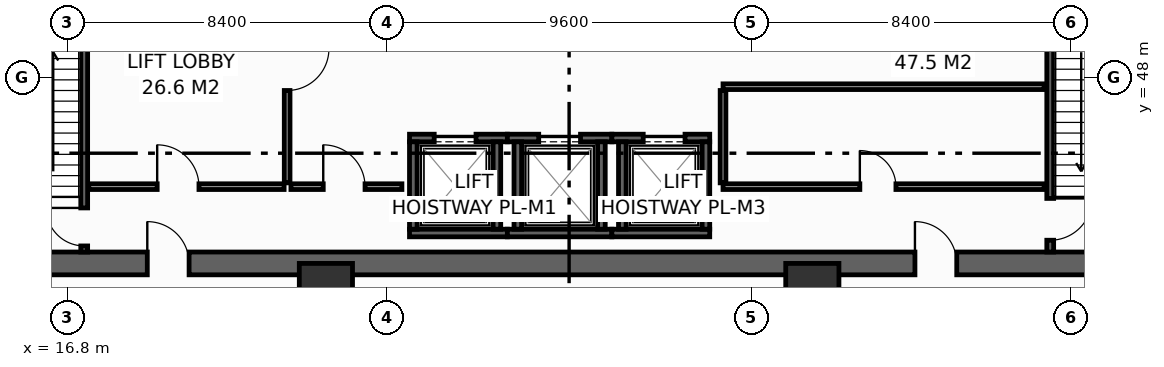
"""IFC4 building model, lengths in metres.
Left out: names, types, materials, properties, quantities, classifications, styles, units other than length and angle.
Written with IfcOpenShell. Run it as: python <this file> out.ifc"""

import sys

from ifc_helpers import new_model, si_unit, direction, frame, frame_2d, origin, origin_2d, place, context, subcontext, project, spatial, rectangle, hollow_rectangle, extrude, element, fill, save


model = new_model("IFC4")
c1 = context("Model", 3, precision=1e-05, world=origin(), true_north=direction((0.0, 1.0)))
c2 = subcontext(c1, "Body", "Model", "MODEL_VIEW")
j1 = project(units=[si_unit("LENGTHUNIT", "METRE"), si_unit("PLANEANGLEUNIT", "RADIAN")], contexts=[c1])
p1 = place(None, origin())
s1 = spatial("IfcSite", under=j1, at=p1, CompositionType="ELEMENT")
p2 = place(p1, origin())
s2 = spatial("IfcBuilding", under=s1, at=p2, CompositionType="ELEMENT")
p3 = place(p2, origin())
s3 = spatial("IfcBuildingStorey", under=s2, at=p3, CompositionType="ELEMENT", Elevation=0.0)
p4 = place(p3, frame((13.5, 43.1, 0.0), z_axis=(0.0, 0.0, 1.0), x_axis=(1.0, 0.0, 0.0)))
e1 = element("IfcWall", 1, at=p4, inside=s3, PredefinedType="SHEAR", context=c2, shape_type="SweptSolid", body=[
    extrude(rectangle(XDim=32.9, YDim=0.6, at=frame_2d((16.45, 0.0))), origin(), (0.0, 0.0, 1.0), 5.7),
])
p5 = place(p4, frame((5.4, 0.0, 0.0)))
e2 = element("IfcOpeningElement", 2, at=p5, cuts=e1, PredefinedType="OPENING", context=c2, shape_type="SweptSolid", body=[
    extrude(rectangle(XDim=1.1, YDim=2.15, at=frame_2d((0.55, 1.075))), frame((0.0, 0.31, 0.0), z_axis=(0.0, -1.0, 0.0), x_axis=(1.0, 0.0, 0.0)), (0.0, 0.0, 1.0), 0.62),
])
p6 = place(p4, frame((25.6, 0.0, 0.0)))
e3 = element("IfcOpeningElement", 3, at=p6, cuts=e1, PredefinedType="OPENING", context=c2, shape_type="SweptSolid", body=[
    extrude(rectangle(XDim=1.1, YDim=2.15, at=frame_2d((0.55, 1.075))), frame((0.0, 0.31, 0.0), z_axis=(0.0, -1.0, 0.0), x_axis=(1.0, 0.0, 0.0)), (0.0, 0.0, 1.0), 0.62),
])
for number, where, z_axis, x_axis in (
    (4, (23.6, 42.4, 0.0), (0.0, 0.0, 1.0), (1.0, 0.0, 0.0)),
    (5, (36.4, 42.4, 0.0), (0.0, 0.0, 1.0), (1.0, 0.0, 0.0)),
):
    element("IfcColumn", number, at=place(p3, frame(where, z_axis=z_axis, x_axis=x_axis)), inside=s3, PredefinedType="COLUMN", context=c2, shape_type="SweptSolid", body=[
        extrude(hollow_rectangle(XDim=1.4, YDim=1.4, WallThickness=0.065, at=origin_2d()), origin(), (0.0, 0.0, 1.0), 6.0),
    ])
p7 = place(p3, frame((25.8, 43.9, 0.0), z_axis=(0.0, 0.0, 1.0), x_axis=(1.0, 0.0, 0.0)))
e6 = element("IfcWall", 6, at=p7, inside=s3, PredefinedType="SHEAR", context=c2, shape_type="SweptSolid", body=[
    extrude(rectangle(XDim=2.575, YDim=0.2, at=frame_2d((1.288, 0.0))), origin(), (0.0, 0.0, 1.0), 5.7),
])
p8 = place(p3, frame((25.8, 46.4, 0.0), z_axis=(0.0, 0.0, 1.0), x_axis=(1.0, 0.0, 0.0)))
e7 = element("IfcWall", 7, at=p8, inside=s3, PredefinedType="SHEAR", context=c2, shape_type="SweptSolid", body=[
    extrude(rectangle(XDim=2.575, YDim=0.2, at=frame_2d((1.288, 0.0))), origin(), (0.0, 0.0, 1.0), 5.7),
])
p9 = place(p8, frame((0.65, 0.0, 0.0)))
e8 = element("IfcOpeningElement", 8, at=p9, cuts=e7, PredefinedType="OPENING", context=c2, shape_type="SweptSolid", body=[
    extrude(rectangle(XDim=1.1, YDim=2.2, at=frame_2d((0.55, 1.1))), frame((0.0, 0.11, 0.0), z_axis=(0.0, -1.0, 0.0), x_axis=(1.0, 0.0, 0.0)), (0.0, 0.0, 1.0), 0.22),
])
for number, where, z_axis, x_axis in (
    (9, (25.9, 44.0, 0.0), (0.0, 0.0, 1.0), (0.0, 1.0, 0.0)),
    (10, (28.1, 44.0, 0.0), (0.0, 0.0, 1.0), (0.0, 1.0, 0.0)),
):
    element("IfcWall", number, at=place(p3, frame(where, z_axis=z_axis, x_axis=x_axis)), inside=s3, PredefinedType="SHEAR", context=c2, shape_type="SweptSolid", body=[
        extrude(rectangle(XDim=2.3, YDim=0.2, at=frame_2d((1.15, 0.0))), origin(), (0.0, 0.0, 1.0), 5.7),
    ])
p10 = place(p3, frame((28.375, 43.9, 0.0), z_axis=(0.0, 0.0, 1.0), x_axis=(1.0, 0.0, 0.0)))
e11 = element("IfcWall", 11, at=p10, inside=s3, PredefinedType="SHEAR", context=c2, shape_type="SweptSolid", body=[
    extrude(rectangle(XDim=2.75, YDim=0.2, at=frame_2d((1.375, 0.0))), origin(), (0.0, 0.0, 1.0), 5.7),
])
p11 = place(p3, frame((28.375, 46.4, 0.0), z_axis=(0.0, 0.0, 1.0), x_axis=(1.0, 0.0, 0.0)))
e12 = element("IfcWall", 12, at=p11, inside=s3, PredefinedType="SHEAR", context=c2, shape_type="SweptSolid", body=[
    extrude(rectangle(XDim=2.75, YDim=0.2, at=frame_2d((1.375, 0.0))), origin(), (0.0, 0.0, 1.0), 5.7),
])
p12 = place(p11, frame((0.825, 0.0, 0.0)))
e13 = element("IfcOpeningElement", 13, at=p12, cuts=e12, PredefinedType="OPENING", context=c2, shape_type="SweptSolid", body=[
    extrude(rectangle(XDim=1.1, YDim=2.2, at=frame_2d((0.55, 1.1))), frame((0.0, 0.11, 0.0), z_axis=(0.0, -1.0, 0.0), x_axis=(1.0, 0.0, 0.0)), (0.0, 0.0, 1.0), 0.22),
])
for number, where, z_axis, x_axis in (
    (14, (28.65, 44.0, 0.0), (0.0, 0.0, 1.0), (0.0, 1.0, 0.0)),
    (15, (30.85, 44.0, 0.0), (0.0, 0.0, 1.0), (0.0, 1.0, 0.0)),
):
    element("IfcWall", number, at=place(p3, frame(where, z_axis=z_axis, x_axis=x_axis)), inside=s3, PredefinedType="SHEAR", context=c2, shape_type="SweptSolid", body=[
        extrude(rectangle(XDim=2.3, YDim=0.2, at=frame_2d((1.15, 0.0))), origin(), (0.0, 0.0, 1.0), 5.7),
    ])
p13 = place(p3, frame((31.125, 43.9, 0.0), z_axis=(0.0, 0.0, 1.0), x_axis=(1.0, 0.0, 0.0)))
e16 = element("IfcWall", 16, at=p13, inside=s3, PredefinedType="SHEAR", context=c2, shape_type="SweptSolid", body=[
    extrude(rectangle(XDim=2.575, YDim=0.2, at=frame_2d((1.288, 0.0))), origin(), (0.0, 0.0, 1.0), 5.7),
])
p14 = place(p3, frame((31.125, 46.4, 0.0), z_axis=(0.0, 0.0, 1.0), x_axis=(1.0, 0.0, 0.0)))
e17 = element("IfcWall", 17, at=p14, inside=s3, PredefinedType="SHEAR", context=c2, shape_type="SweptSolid", body=[
    extrude(rectangle(XDim=2.575, YDim=0.2, at=frame_2d((1.288, 0.0))), origin(), (0.0, 0.0, 1.0), 5.7),
])
p15 = place(p14, frame((0.825, 0.0, 0.0)))
e18 = element("IfcOpeningElement", 18, at=p15, cuts=e17, PredefinedType="OPENING", context=c2, shape_type="SweptSolid", body=[
    extrude(rectangle(XDim=1.1, YDim=2.2, at=frame_2d((0.55, 1.1))), frame((0.0, 0.11, 0.0), z_axis=(0.0, -1.0, 0.0), x_axis=(1.0, 0.0, 0.0)), (0.0, 0.0, 1.0), 0.22),
])
for number, where, z_axis, x_axis in (
    (19, (31.4, 44.0, 0.0), (0.0, 0.0, 1.0), (0.0, 1.0, 0.0)),
    (20, (33.6, 44.0, 0.0), (0.0, 0.0, 1.0), (0.0, 1.0, 0.0)),
):
    element("IfcWall", number, at=place(p3, frame(where, z_axis=z_axis, x_axis=x_axis)), inside=s3, PredefinedType="SHEAR", context=c2, shape_type="SweptSolid", body=[
        extrude(rectangle(XDim=2.3, YDim=0.2, at=frame_2d((1.15, 0.0))), origin(), (0.0, 0.0, 1.0), 5.7),
    ])
p16 = place(p3, frame((17.24, 43.4, 0.0), z_axis=(0.0, 0.0, 1.0), x_axis=(0.0, 1.0, 0.0)))
e21 = element("IfcWall", 21, at=p16, inside=s3, PredefinedType="SHEAR", context=c2, shape_type="SweptSolid", body=[
    extrude(rectangle(XDim=10.4, YDim=0.18, at=frame_2d((5.2, 0.0))), origin(), (0.0, 0.0, 1.0), 5.7),
])
p17 = place(p16, frame((0.16, 0.0, 0.0)))
e22 = element("IfcOpeningElement", 22, at=p17, cuts=e21, PredefinedType="OPENING", context=c2, shape_type="SweptSolid", body=[
    extrude(rectangle(XDim=1.0, YDim=2.15, at=frame_2d((0.5, 1.075))), frame((0.0, 0.1, 0.0), z_axis=(0.0, -1.0, 0.0), x_axis=(1.0, 0.0, 0.0)), (0.0, 0.0, 1.0), 0.2),
])
p18 = place(p3, frame((42.66, 53.8, 0.0), z_axis=(0.0, 0.0, 1.0), x_axis=(0.0, -1.0, 0.0)))
e23 = element("IfcWall", 23, at=p18, inside=s3, PredefinedType="SHEAR", context=c2, shape_type="SweptSolid", body=[
    extrude(rectangle(XDim=10.4, YDim=0.18, at=frame_2d((5.2, 0.0))), origin(), (0.0, 0.0, 1.0), 5.7),
])
p19 = place(p18, frame((8.99, 0.0, 0.0)))
e24 = element("IfcOpeningElement", 24, at=p19, cuts=e23, PredefinedType="OPENING", context=c2, shape_type="SweptSolid", body=[
    extrude(rectangle(XDim=1.1, YDim=2.15, at=frame_2d((0.55, 1.075))), frame((0.0, 0.1, 0.0), z_axis=(0.0, -1.0, 0.0), x_axis=(1.0, 0.0, 0.0)), (0.0, 0.0, 1.0), 0.2),
])
p20 = place(p3, frame((17.36, 45.12, 0.0), z_axis=(0.0, 0.0, 1.0), x_axis=(1.0, 0.0, 0.0)))
e25 = element("IfcWall", 25, at=p20, inside=s3, PredefinedType="PARTITIONING", context=c2, shape_type="SweptSolid", body=[
    extrude(rectangle(XDim=5.14, YDim=0.15, at=frame_2d((2.57, 0.0))), origin(), (0.0, 0.0, 1.0), 5.7),
])
p21 = place(p20, frame((1.8, 0.0, 0.0)))
e26 = element("IfcOpeningElement", 26, at=p21, cuts=e25, PredefinedType="OPENING", context=c2, shape_type="SweptSolid", body=[
    extrude(rectangle(XDim=1.1, YDim=2.15, at=frame_2d((0.55, 1.075))), frame((0.0, 0.085, 0.0), z_axis=(0.0, -1.0, 0.0), x_axis=(1.0, 0.0, 0.0)), (0.0, 0.0, 1.0), 0.17),
])
p22 = place(p3, frame((22.58, 50.55, 0.0), z_axis=(0.0, 0.0, 1.0), x_axis=(0.0, -1.0, 0.0)))
e27 = element("IfcWall", 27, at=p22, inside=s3, PredefinedType="PARTITIONING", context=c2, shape_type="SweptSolid", body=[
    extrude(rectangle(XDim=5.33, YDim=0.15, at=frame_2d((2.665, 0.0))), origin(), (0.0, 0.0, 1.0), 5.7),
])
p23 = place(p22, frame((1.8, 0.0, 0.0)))
e28 = element("IfcOpeningElement", 28, at=p23, cuts=e27, PredefinedType="OPENING", context=c2, shape_type="SweptSolid", body=[
    extrude(rectangle(XDim=1.1, YDim=2.15, at=frame_2d((0.55, 1.075))), frame((0.0, 0.085, 0.0), z_axis=(0.0, -1.0, 0.0), x_axis=(1.0, 0.0, 0.0)), (0.0, 0.0, 1.0), 0.17),
])
p24 = place(p3, frame((22.68, 45.12, 0.0), z_axis=(0.0, 0.0, 1.0), x_axis=(1.0, 0.0, 0.0)))
e29 = element("IfcWall", 29, at=p24, inside=s3, PredefinedType="PARTITIONING", context=c2, shape_type="SweptSolid", body=[
    extrude(rectangle(XDim=2.92, YDim=0.15, at=frame_2d((1.46, 0.0))), origin(), (0.0, 0.0, 1.0), 5.7),
])
p25 = place(p24, frame((0.85, 0.0, 0.0)))
e30 = element("IfcOpeningElement", 30, at=p25, cuts=e29, PredefinedType="OPENING", context=c2, shape_type="SweptSolid", body=[
    extrude(rectangle(XDim=1.1, YDim=2.15, at=frame_2d((0.55, 1.075))), frame((0.0, 0.085, 0.0), z_axis=(0.0, -1.0, 0.0), x_axis=(1.0, 0.0, 0.0)), (0.0, 0.0, 1.0), 0.17),
])
p26 = place(p3, frame((34.05, 45.12, 0.0), z_axis=(0.0, 0.0, 1.0), x_axis=(1.0, 0.0, 0.0)))
e31 = element("IfcWall", 31, at=p26, inside=s3, PredefinedType="PARTITIONING", context=c2, shape_type="SweptSolid", body=[
    extrude(rectangle(XDim=8.45, YDim=0.15, at=frame_2d((4.225, 0.0))), origin(), (0.0, 0.0, 1.0), 5.7),
])
p27 = place(p26, frame((3.6, 0.0, 0.0)))
e32 = element("IfcOpeningElement", 32, at=p27, cuts=e31, PredefinedType="OPENING", context=c2, shape_type="SweptSolid", body=[
    extrude(rectangle(XDim=0.95, YDim=2.15, at=frame_2d((0.475, 1.075))), frame((0.0, 0.085, 0.0), z_axis=(0.0, -1.0, 0.0), x_axis=(1.0, 0.0, 0.0)), (0.0, 0.0, 1.0), 0.17),
])
p28 = place(p3, frame((34.05, 47.75, 0.0), z_axis=(0.0, 0.0, 1.0), x_axis=(1.0, 0.0, 0.0)))
e33 = element("IfcWall", 33, at=p28, inside=s3, PredefinedType="PARTITIONING", context=c2, shape_type="SweptSolid", body=[
    extrude(rectangle(XDim=8.45, YDim=0.15, at=frame_2d((4.225, 0.0))), origin(), (0.0, 0.0, 1.0), 5.7),
])
p29 = place(p3, frame((34.05, 45.22, 0.0), z_axis=(0.0, 0.0, 1.0), x_axis=(0.0, 1.0, 0.0)))
e34 = element("IfcWall", 34, at=p29, inside=s3, PredefinedType="PARTITIONING", context=c2, shape_type="SweptSolid", body=[
    extrude(rectangle(XDim=2.43, YDim=0.15, at=frame_2d((1.215, 0.0))), origin(), (0.0, 0.0, 1.0), 5.7),
])
p30 = place(p9, origin())
e35 = element("IfcDoor", 35, at=p30, inside=s3, OperationType="SLIDING_TO_LEFT", PredefinedType="DOOR", context=c2, shape_type="SweptSolid", body=[
    extrude(rectangle(XDim=1.1, YDim=2.2, at=frame_2d((0.55, 1.1))), frame((0.0, 0.025, 0.0), z_axis=(0.0, -1.0, 0.0), x_axis=(1.0, 0.0, 0.0)), (0.0, 0.0, 1.0), 0.05),
])
fill(e8, e35)
p31 = place(p12, origin())
e36 = element("IfcDoor", 36, at=p31, inside=s3, OperationType="SLIDING_TO_LEFT", PredefinedType="DOOR", context=c2, shape_type="SweptSolid", body=[
    extrude(rectangle(XDim=1.1, YDim=2.2, at=frame_2d((0.55, 1.1))), frame((0.0, 0.025, 0.0), z_axis=(0.0, -1.0, 0.0), x_axis=(1.0, 0.0, 0.0)), (0.0, 0.0, 1.0), 0.05),
])
fill(e13, e36)
p32 = place(p15, origin())
e37 = element("IfcDoor", 37, at=p32, inside=s3, OperationType="SLIDING_TO_LEFT", PredefinedType="DOOR", context=c2, shape_type="SweptSolid", body=[
    extrude(rectangle(XDim=1.1, YDim=2.2, at=frame_2d((0.55, 1.1))), frame((0.0, 0.025, 0.0), z_axis=(0.0, -1.0, 0.0), x_axis=(1.0, 0.0, 0.0)), (0.0, 0.0, 1.0), 0.05),
])
fill(e18, e37)
p33 = place(p17, origin())
e38 = element("IfcDoor", 38, at=p33, inside=s3, OperationType="SINGLE_SWING_RIGHT", PredefinedType="DOOR", context=c2, shape_type="SweptSolid", body=[
    extrude(rectangle(XDim=1.0, YDim=2.15, at=frame_2d((0.5, 1.075))), frame((0.0, 0.025, 0.0), z_axis=(0.0, -1.0, 0.0), x_axis=(1.0, 0.0, 0.0)), (0.0, 0.0, 1.0), 0.05),
])
fill(e22, e38)
p34 = place(p19, origin())
e39 = element("IfcDoor", 39, at=p34, inside=s3, OperationType="SINGLE_SWING_LEFT", PredefinedType="DOOR", context=c2, shape_type="SweptSolid", body=[
    extrude(rectangle(XDim=1.1, YDim=2.15, at=frame_2d((0.55, 1.075))), frame((0.0, 0.025, 0.0), z_axis=(0.0, -1.0, 0.0), x_axis=(1.0, 0.0, 0.0)), (0.0, 0.0, 1.0), 0.05),
])
fill(e24, e39)
p35 = place(p21, origin())
e40 = element("IfcDoor", 40, at=p35, inside=s3, OperationType="SINGLE_SWING_LEFT", PredefinedType="DOOR", context=c2, shape_type="SweptSolid", body=[
    extrude(rectangle(XDim=1.1, YDim=2.15, at=frame_2d((0.55, 1.075))), frame((0.0, 0.025, 0.0), z_axis=(0.0, -1.0, 0.0), x_axis=(1.0, 0.0, 0.0)), (0.0, 0.0, 1.0), 0.05),
])
fill(e26, e40)
p36 = place(p23, origin())
e41 = element("IfcDoor", 41, at=p36, inside=s3, OperationType="SINGLE_SWING_LEFT", PredefinedType="DOOR", context=c2, shape_type="SweptSolid", body=[
    extrude(rectangle(XDim=1.1, YDim=2.15, at=frame_2d((0.55, 1.075))), frame((0.0, 0.025, 0.0), z_axis=(0.0, -1.0, 0.0), x_axis=(1.0, 0.0, 0.0)), (0.0, 0.0, 1.0), 0.05),
])
fill(e28, e41)
p37 = place(p25, origin())
e42 = element("IfcDoor", 42, at=p37, inside=s3, OperationType="SINGLE_SWING_LEFT", PredefinedType="DOOR", context=c2, shape_type="SweptSolid", body=[
    extrude(rectangle(XDim=1.1, YDim=2.15, at=frame_2d((0.55, 1.075))), frame((0.0, 0.025, 0.0), z_axis=(0.0, -1.0, 0.0), x_axis=(1.0, 0.0, 0.0)), (0.0, 0.0, 1.0), 0.05),
])
fill(e30, e42)
p38 = place(p5, origin())
e43 = element("IfcDoor", 43, at=p38, inside=s3, OperationType="SINGLE_SWING_LEFT", PredefinedType="DOOR", context=c2, shape_type="SweptSolid", body=[
    extrude(rectangle(XDim=1.1, YDim=2.15, at=frame_2d((0.55, 1.075))), frame((0.0, 0.025, 0.0), z_axis=(0.0, -1.0, 0.0), x_axis=(1.0, 0.0, 0.0)), (0.0, 0.0, 1.0), 0.05),
])
fill(e2, e43)
p39 = place(p6, origin())
e44 = element("IfcDoor", 44, at=p39, inside=s3, OperationType="SINGLE_SWING_LEFT", PredefinedType="DOOR", context=c2, shape_type="SweptSolid", body=[
    extrude(rectangle(XDim=1.1, YDim=2.15, at=frame_2d((0.55, 1.075))), frame((0.0, 0.025, 0.0), z_axis=(0.0, -1.0, 0.0), x_axis=(1.0, 0.0, 0.0)), (0.0, 0.0, 1.0), 0.05),
])
fill(e3, e44)
p40 = place(p27, origin())
e45 = element("IfcDoor", 45, at=p40, inside=s3, OperationType="SINGLE_SWING_LEFT", PredefinedType="DOOR", context=c2, shape_type="SweptSolid", body=[
    extrude(rectangle(XDim=0.95, YDim=2.15, at=frame_2d((0.475, 1.075))), frame((0.0, 0.025, 0.0), z_axis=(0.0, -1.0, 0.0), x_axis=(1.0, 0.0, 0.0)), (0.0, 0.0, 1.0), 0.05),
])
fill(e32, e45)
save(model, sys.argv[1])
